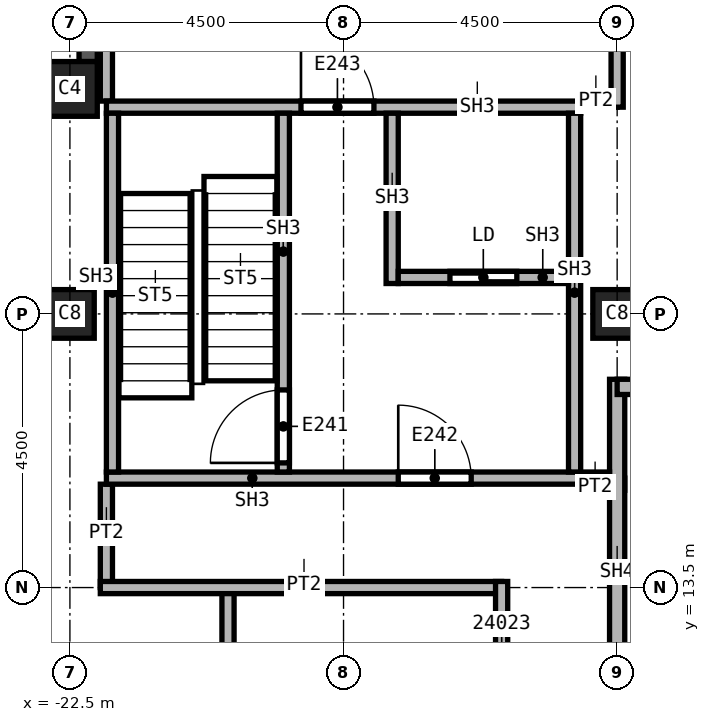
"""IFC4 building model, lengths in metres.
Left out: names, types, materials, properties, quantities, classifications, styles, units other than length and angle.
Written with IfcOpenShell. Run it as: python <this file> out.ifc"""

import sys

from ifc_helpers import new_model, si_unit, direction, frame, frame_2d, origin, origin_2d, place, context, subcontext, project, spatial, rectangle, extrude, element, fill, save


model = new_model("IFC4")
c1 = context("Model", 3, precision=1e-05, world=origin(), true_north=direction((0.0, 1.0)))
c2 = subcontext(c1, "Body", "Model", "MODEL_VIEW")
j1 = project(units=[si_unit("LENGTHUNIT", "METRE"), si_unit("PLANEANGLEUNIT", "RADIAN")], contexts=[c1])
p1 = place(None, origin())
s1 = spatial("IfcSite", under=j1, at=p1, CompositionType="ELEMENT")
p2 = place(p1, origin())
s2 = spatial("IfcBuilding", under=s1, at=p2, CompositionType="ELEMENT")
p3 = place(p2, frame((0.0, 0.0, 346.0)))
s3 = spatial("IfcBuildingStorey", under=s2, at=p3, CompositionType="ELEMENT", Elevation=346.0)
for number, where, z_axis, x_axis in (
    (1, (-13.5, 18.0, 0.0), (0.0, 0.0, 1.0), (1.0, 0.0, 0.0)),
    (2, (-22.5, 18.0, 0.0), (0.0, 0.0, 1.0), (1.0, 0.0, 0.0)),
):
    element("IfcColumn", number, at=place(p3, frame(where, z_axis=z_axis, x_axis=x_axis)), inside=s3, PredefinedType="COLUMN", context=c2, shape_type="SweptSolid", body=[
        extrude(rectangle(XDim=0.8, YDim=0.8, at=origin_2d()), origin(), (0.0, 0.0, 1.0), 3.59),
    ])
p4 = place(p3, frame((-22.5, 21.7, 0.0), z_axis=(0.0, 0.328819519572, 0.944392780335), x_axis=(-1.0, 0.0, 0.0)))
e3 = element("IfcColumn", 3, at=p4, inside=s3, PredefinedType="COLUMN", context=c2, shape_type="SweptSolid", body=[
    extrude(rectangle(XDim=0.9, YDim=0.9, at=origin_2d()), origin(), (0.0, 0.0, 1.0), 3.802),
])
p5 = place(p3, frame((-22.2, 24.95, 0.0), z_axis=(0.0, 0.0, 1.0), x_axis=(0.0, -1.0, 0.0)))
e4 = element("IfcWall", 4, at=p5, inside=s3, PredefinedType="SOLIDWALL", context=c2, shape_type="SweptSolid", body=[
    extrude(rectangle(XDim=2.8, YDim=0.3, at=frame_2d((1.4, 0.0))), origin(), (0.0, 0.0, 1.0), 2.99),
])
p6 = place(p3, frame((-21.9, 13.5, 0.0), z_axis=(0.0, 0.0, 1.0), x_axis=(0.0, 1.0, 0.0)))
e5 = element("IfcWall", 5, at=p6, inside=s3, PredefinedType="PARTITIONING", context=c2, shape_type="SweptSolid", body=[
    extrude(rectangle(XDim=1.7, YDim=0.2, at=frame_2d((0.85, 0.0))), origin(), (0.0, 0.0, 1.0), 3.59),
])
p7 = place(p3, frame((-21.9, 21.5, 0.0), z_axis=(0.0, 0.0, 1.0), x_axis=(0.0, 1.0, 0.0)))
e6 = element("IfcWall", 6, at=p7, inside=s3, PredefinedType="PARTITIONING", context=c2, shape_type="SweptSolid", body=[
    extrude(rectangle(XDim=3.45, YDim=0.2, at=frame_2d((1.725, 0.0))), origin(), (0.0, 0.0, 1.0), 3.59),
])
p8 = place(p3, frame((-19.9, -0.1, 0.0), z_axis=(0.0, 0.0, 1.0), x_axis=(0.0, 1.0, 0.0)))
e7 = element("IfcWall", 7, at=p8, inside=s3, PredefinedType="PARTITIONING", context=c2, shape_type="SweptSolid", body=[
    extrude(rectangle(XDim=13.6, YDim=0.2, at=frame_2d((6.8, 0.0))), origin(), (0.0, 0.0, 1.0), 3.59),
])
p9 = place(p8, frame((3.85, 0.0, 0.0)))
e8 = element("IfcOpeningElement", 8, at=p9, cuts=e7, PredefinedType="OPENING", context=c2, shape_type="SweptSolid", body=[
    extrude(rectangle(XDim=1.0, YDim=2.1, at=frame_2d((0.5, 1.05))), frame((0.0, 0.1, 0.0), z_axis=(0.0, -1.0, 0.0), x_axis=(1.0, 0.0, 0.0)), (0.0, 0.0, 1.0), 0.2),
])
p10 = place(p3, frame((-15.4, 13.5, 0.0), z_axis=(0.0, 0.0, 1.0), x_axis=(-1.0, 0.0, 0.0)))
e9 = element("IfcWall", 9, at=p10, inside=s3, PredefinedType="PARTITIONING", context=c2, shape_type="SweptSolid", body=[
    extrude(rectangle(XDim=6.6, YDim=0.2, at=frame_2d((3.3, 0.0))), origin(), (0.0, 0.0, 1.0), 3.59),
])
p11 = place(p3, frame((-15.4, -24.95, 0.0), z_axis=(0.0, 0.0, 1.0), x_axis=(0.0, 1.0, 0.0)))
e10 = element("IfcWall", 10, at=p11, inside=s3, PredefinedType="PARTITIONING", context=c2, shape_type="SweptSolid", body=[
    extrude(rectangle(XDim=38.55, YDim=0.2, at=frame_2d((19.275, 0.0))), origin(), (0.0, 0.0, 1.0), 3.59),
])
p12 = place(p11, frame((30.5, 0.0, 0.0)))
e11 = element("IfcOpeningElement", 11, at=p12, cuts=e10, PredefinedType="OPENING", context=c2, shape_type="SweptSolid", body=[
    extrude(rectangle(XDim=1.0, YDim=2.1, at=frame_2d((0.5, 1.05))), frame((0.0, 0.1, 0.0), z_axis=(0.0, -1.0, 0.0), x_axis=(1.0, 0.0, 0.0)), (0.0, 0.0, 1.0), 0.2),
])
p13 = place(p11, frame((36.35, 0.0, 0.0)))
e12 = element("IfcOpeningElement", 12, at=p13, cuts=e10, PredefinedType="OPENING", context=c2, shape_type="SweptSolid", body=[
    extrude(rectangle(XDim=1.0, YDim=2.1, at=frame_2d((0.5, 1.05))), frame((0.0, 0.1, 0.0), z_axis=(0.0, -1.0, 0.0), x_axis=(1.0, 0.0, 0.0)), (0.0, 0.0, 1.0), 0.2),
])
p14 = place(p11, frame((1.9, 0.0, 0.0)))
e13 = element("IfcOpeningElement", 13, at=p14, cuts=e10, PredefinedType="OPENING", context=c2, shape_type="SweptSolid", body=[
    extrude(rectangle(XDim=1.0, YDim=2.1, at=frame_2d((0.5, 1.05))), frame((0.0, 0.1, 0.0), z_axis=(0.0, -1.0, 0.0), x_axis=(1.0, 0.0, 0.0)), (0.0, 0.0, 1.0), 0.2),
])
p15 = place(p11, frame((5.6, 0.0, 0.0)))
e14 = element("IfcOpeningElement", 14, at=p15, cuts=e10, PredefinedType="OPENING", context=c2, shape_type="SweptSolid", body=[
    extrude(rectangle(XDim=1.0, YDim=2.1, at=frame_2d((0.5, 1.05))), frame((0.0, 0.1, 0.0), z_axis=(0.0, -1.0, 0.0), x_axis=(1.0, 0.0, 0.0)), (0.0, 0.0, 1.0), 0.2),
])
p16 = place(p11, frame((9.35, 0.0, 0.0)))
e15 = element("IfcOpeningElement", 15, at=p16, cuts=e10, PredefinedType="OPENING", context=c2, shape_type="SweptSolid", body=[
    extrude(rectangle(XDim=1.0, YDim=2.1, at=frame_2d((0.5, 1.05))), frame((0.0, 0.1, 0.0), z_axis=(0.0, -1.0, 0.0), x_axis=(1.0, 0.0, 0.0)), (0.0, 0.0, 1.0), 0.2),
])
p17 = place(p11, frame((16.1, 0.0, 0.0)))
e16 = element("IfcOpeningElement", 16, at=p17, cuts=e10, PredefinedType="OPENING", context=c2, shape_type="SweptSolid", body=[
    extrude(rectangle(XDim=1.0, YDim=2.1, at=frame_2d((0.5, 1.05))), frame((0.0, 0.1, 0.0), z_axis=(0.0, -1.0, 0.0), x_axis=(1.0, 0.0, 0.0)), (0.0, 0.0, 1.0), 0.2),
])
p18 = place(p3, frame((-14.1, 15.2, 0.0), z_axis=(0.0, 0.0, 1.0), x_axis=(1.0, 0.0, 0.0)))
e17 = element("IfcWall", 17, at=p18, inside=s3, PredefinedType="PARTITIONING", context=c2, shape_type="SweptSolid", body=[
    extrude(rectangle(XDim=0.725, YDim=0.2, at=frame_2d((0.363, 0.0))), origin(), (0.0, 0.0, 1.0), 3.59),
])
p19 = place(p3, frame((-13.5, 21.5, 0.0), z_axis=(0.0, 0.0, 1.0), x_axis=(-1.0, 0.0, 0.0)))
e18 = element("IfcWall", 18, at=p19, inside=s3, PredefinedType="PARTITIONING", context=c2, shape_type="SweptSolid", body=[
    extrude(rectangle(XDim=0.6, YDim=0.2, at=frame_2d((0.3, 0.0))), origin(), (0.0, 0.0, 1.0), 3.59),
])
p20 = place(p3, frame((-13.5, 24.95, 0.0), z_axis=(0.0, 0.0, 1.0), x_axis=(0.0, -1.0, 0.0)))
e19 = element("IfcWall", 19, at=p20, inside=s3, PredefinedType="PARTITIONING", context=c2, shape_type="SweptSolid", body=[
    extrude(rectangle(XDim=3.55, YDim=0.2, at=frame_2d((1.775, 0.0))), origin(), (0.0, 0.0, 1.0), 3.59),
])
p21 = place(p20, frame((1.3, 0.0, 0.0)))
e20 = element("IfcOpeningElement", 20, at=p21, cuts=e19, PredefinedType="OPENING", context=c2, shape_type="SweptSolid", body=[
    extrude(rectangle(XDim=1.0, YDim=2.1, at=frame_2d((0.5, 1.05))), frame((0.0, 0.1, 0.0), z_axis=(0.0, -1.0, 0.0), x_axis=(1.0, 0.0, 0.0)), (0.0, 0.0, 1.0), 0.2),
])
p22 = place(p3, frame((-13.5, 12.175, 0.0), z_axis=(0.0, 0.0, 1.0), x_axis=(0.0, 1.0, 0.0)))
e21 = element("IfcWall", 21, at=p22, inside=s3, PredefinedType="SOLIDWALL", context=c2, shape_type="SweptSolid", body=[
    extrude(rectangle(XDim=4.75, YDim=0.25, at=frame_2d((2.375, 0.0))), origin(), (0.0, 0.0, 1.0), 3.59),
])
p23 = place(p3, frame((-13.5, 16.8, 0.0), z_axis=(0.0, 0.0, 1.0), x_axis=(1.0, 0.0, 0.0)))
e22 = element("IfcWall", 22, at=p23, inside=s3, PredefinedType="SOLIDWALL", context=c2, shape_type="SweptSolid", body=[
    extrude(rectangle(XDim=9.125, YDim=0.25, at=frame_2d((4.562, 0.0))), origin(), (0.0, 0.0, 1.0), 3.59),
])
p24 = place(p3, frame((-21.9, 15.3, 0.0), z_axis=(0.0, 0.0, 1.0), x_axis=(1.0, 0.0, 0.0)))
e23 = element("IfcWall", 23, at=p24, inside=s3, PredefinedType="SOLIDWALL", context=c2, shape_type="SweptSolid", body=[
    extrude(rectangle(XDim=8.275, YDim=0.2, at=frame_2d((4.137, 0.0))), origin(), (0.0, 0.0, 1.0), 3.59),
])
p25 = place(p24, frame((4.8, 0.0, 0.0)))
e24 = element("IfcOpeningElement", 24, at=p25, cuts=e23, PredefinedType="OPENING", context=c2, shape_type="SweptSolid", body=[
    extrude(rectangle(XDim=1.2, YDim=2.1, at=frame_2d((0.6, 1.05))), frame((0.0, 0.1, 0.0), z_axis=(0.0, -1.0, 0.0), x_axis=(1.0, 0.0, 0.0)), (0.0, 0.0, 1.0), 0.2),
])
p26 = place(p3, frame((-21.9, 21.4, 0.0), z_axis=(0.0, 0.0, 1.0), x_axis=(1.0, 0.0, 0.0)))
e25 = element("IfcWall", 25, at=p26, inside=s3, PredefinedType="SOLIDWALL", context=c2, shape_type="SweptSolid", body=[
    extrude(rectangle(XDim=7.8, YDim=0.2, at=frame_2d((3.9, 0.0))), origin(), (0.0, 0.0, 1.0), 3.59),
])
p27 = place(p26, frame((3.2, 0.0, 0.0)))
e26 = element("IfcOpeningElement", 26, at=p27, cuts=e25, PredefinedType="OPENING", context=c2, shape_type="SweptSolid", body=[
    extrude(rectangle(XDim=1.2, YDim=2.1, at=frame_2d((0.6, 1.05))), frame((0.0, 0.1, 0.0), z_axis=(0.0, -1.0, 0.0), x_axis=(1.0, 0.0, 0.0)), (0.0, 0.0, 1.0), 0.2),
])
for number, where, z_axis, x_axis in (
    (27, (-21.8, 15.4, 0.0), (0.0, 0.0, 1.0), (0.0, 1.0, 0.0)),
    (28, (-14.2, 15.4, 0.0), (0.0, 0.0, 1.0), (0.0, 1.0, 0.0)),
):
    element("IfcWall", number, at=place(p3, frame(where, z_axis=z_axis, x_axis=x_axis)), inside=s3, PredefinedType="SOLIDWALL", context=c2, shape_type="SweptSolid", body=[
        extrude(rectangle(XDim=5.9, YDim=0.2, at=frame_2d((2.95, 0.0))), origin(), (0.0, 0.0, 1.0), 3.59),
    ])
p28 = place(p3, frame((-18.99, 15.4, 0.0), z_axis=(0.0, 0.0, 1.0), x_axis=(0.0, 1.0, 0.0)))
e29 = element("IfcWall", 29, at=p28, inside=s3, PredefinedType="SOLIDWALL", context=c2, shape_type="SweptSolid", body=[
    extrude(rectangle(XDim=5.9, YDim=0.2, at=frame_2d((2.95, 0.0))), origin(), (0.0, 0.0, 1.0), 3.59),
])
p29 = place(p28, frame((0.15, 0.0, 0.0)))
e30 = element("IfcOpeningElement", 30, at=p29, cuts=e29, PredefinedType="OPENING", context=c2, shape_type="SweptSolid", body=[
    extrude(rectangle(XDim=1.2, YDim=2.1, at=frame_2d((0.6, 1.05))), frame((0.0, 0.1, 0.0), z_axis=(0.0, -1.0, 0.0), x_axis=(1.0, 0.0, 0.0)), (0.0, 0.0, 1.0), 0.2),
])
p30 = place(p3, frame((-17.2, 18.5, 0.0), z_axis=(0.0, 0.0, 1.0), x_axis=(0.0, 1.0, 0.0)))
e31 = element("IfcWall", 31, at=p30, inside=s3, PredefinedType="SOLIDWALL", context=c2, shape_type="SweptSolid", body=[
    extrude(rectangle(XDim=2.8, YDim=0.2, at=frame_2d((1.4, 0.0))), origin(), (0.0, 0.0, 1.0), 3.59),
])
p31 = place(p3, frame((-17.1, 18.6, 0.0), z_axis=(0.0, 0.0, 1.0), x_axis=(1.0, 0.0, 0.0)))
e32 = element("IfcWall", 32, at=p31, inside=s3, PredefinedType="SOLIDWALL", context=c2, shape_type="SweptSolid", body=[
    extrude(rectangle(XDim=2.8, YDim=0.2, at=frame_2d((1.4, 0.0))), origin(), (0.0, 0.0, 1.0), 3.59),
])
p32 = place(p31, frame((0.85, 0.0, 0.0)))
e33 = element("IfcOpeningElement", 33, at=p32, cuts=e32, PredefinedType="OPENING", context=c2, shape_type="SweptSolid", body=[
    extrude(rectangle(XDim=1.1, YDim=2.1, at=frame_2d((0.55, 1.05))), frame((0.0, 0.1, 0.0), z_axis=(0.0, -1.0, 0.0), x_axis=(1.0, 0.0, 0.0)), (0.0, 0.0, 1.0), 0.2),
])
p33 = place(p29, origin())
e34 = element("IfcDoor", 34, at=p33, inside=s3, OperationType="SINGLE_SWING_LEFT", PredefinedType="DOOR", context=c2, shape_type="SweptSolid", body=[
    extrude(rectangle(XDim=1.2, YDim=2.1, at=frame_2d((0.6, 1.05))), frame((0.0, 0.025, 0.0), z_axis=(0.0, -1.0, 0.0), x_axis=(1.0, 0.0, 0.0)), (0.0, 0.0, 1.0), 0.05),
])
fill(e30, e34)
p34 = place(p32, origin())
e35 = element("IfcDoor", 35, at=p34, inside=s3, OperationType="SLIDING_TO_LEFT", PredefinedType="DOOR", context=c2, shape_type="SweptSolid", body=[
    extrude(rectangle(XDim=1.1, YDim=2.1, at=frame_2d((0.55, 1.05))), frame((0.0, 0.025, 0.0), z_axis=(0.0, -1.0, 0.0), x_axis=(1.0, 0.0, 0.0)), (0.0, 0.0, 1.0), 0.05),
])
fill(e33, e35)
p35 = place(p25, origin())
e36 = element("IfcDoor", 36, at=p35, inside=s3, OperationType="SINGLE_SWING_RIGHT", PredefinedType="DOOR", context=c2, shape_type="SweptSolid", body=[
    extrude(rectangle(XDim=1.2, YDim=2.1, at=frame_2d((0.6, 1.05))), frame((0.0, 0.025, 0.0), z_axis=(0.0, -1.0, 0.0), x_axis=(1.0, 0.0, 0.0)), (0.0, 0.0, 1.0), 0.05),
])
fill(e24, e36)
p36 = place(p27, origin())
e37 = element("IfcDoor", 37, at=p36, inside=s3, OperationType="SINGLE_SWING_LEFT", PredefinedType="DOOR", context=c2, shape_type="SweptSolid", body=[
    extrude(rectangle(XDim=1.2, YDim=2.1, at=frame_2d((0.6, 1.05))), frame((0.0, 0.025, 0.0), z_axis=(0.0, -1.0, 0.0), x_axis=(1.0, 0.0, 0.0)), (0.0, 0.0, 1.0), 0.05),
])
fill(e26, e37)
save(model, sys.argv[1])
